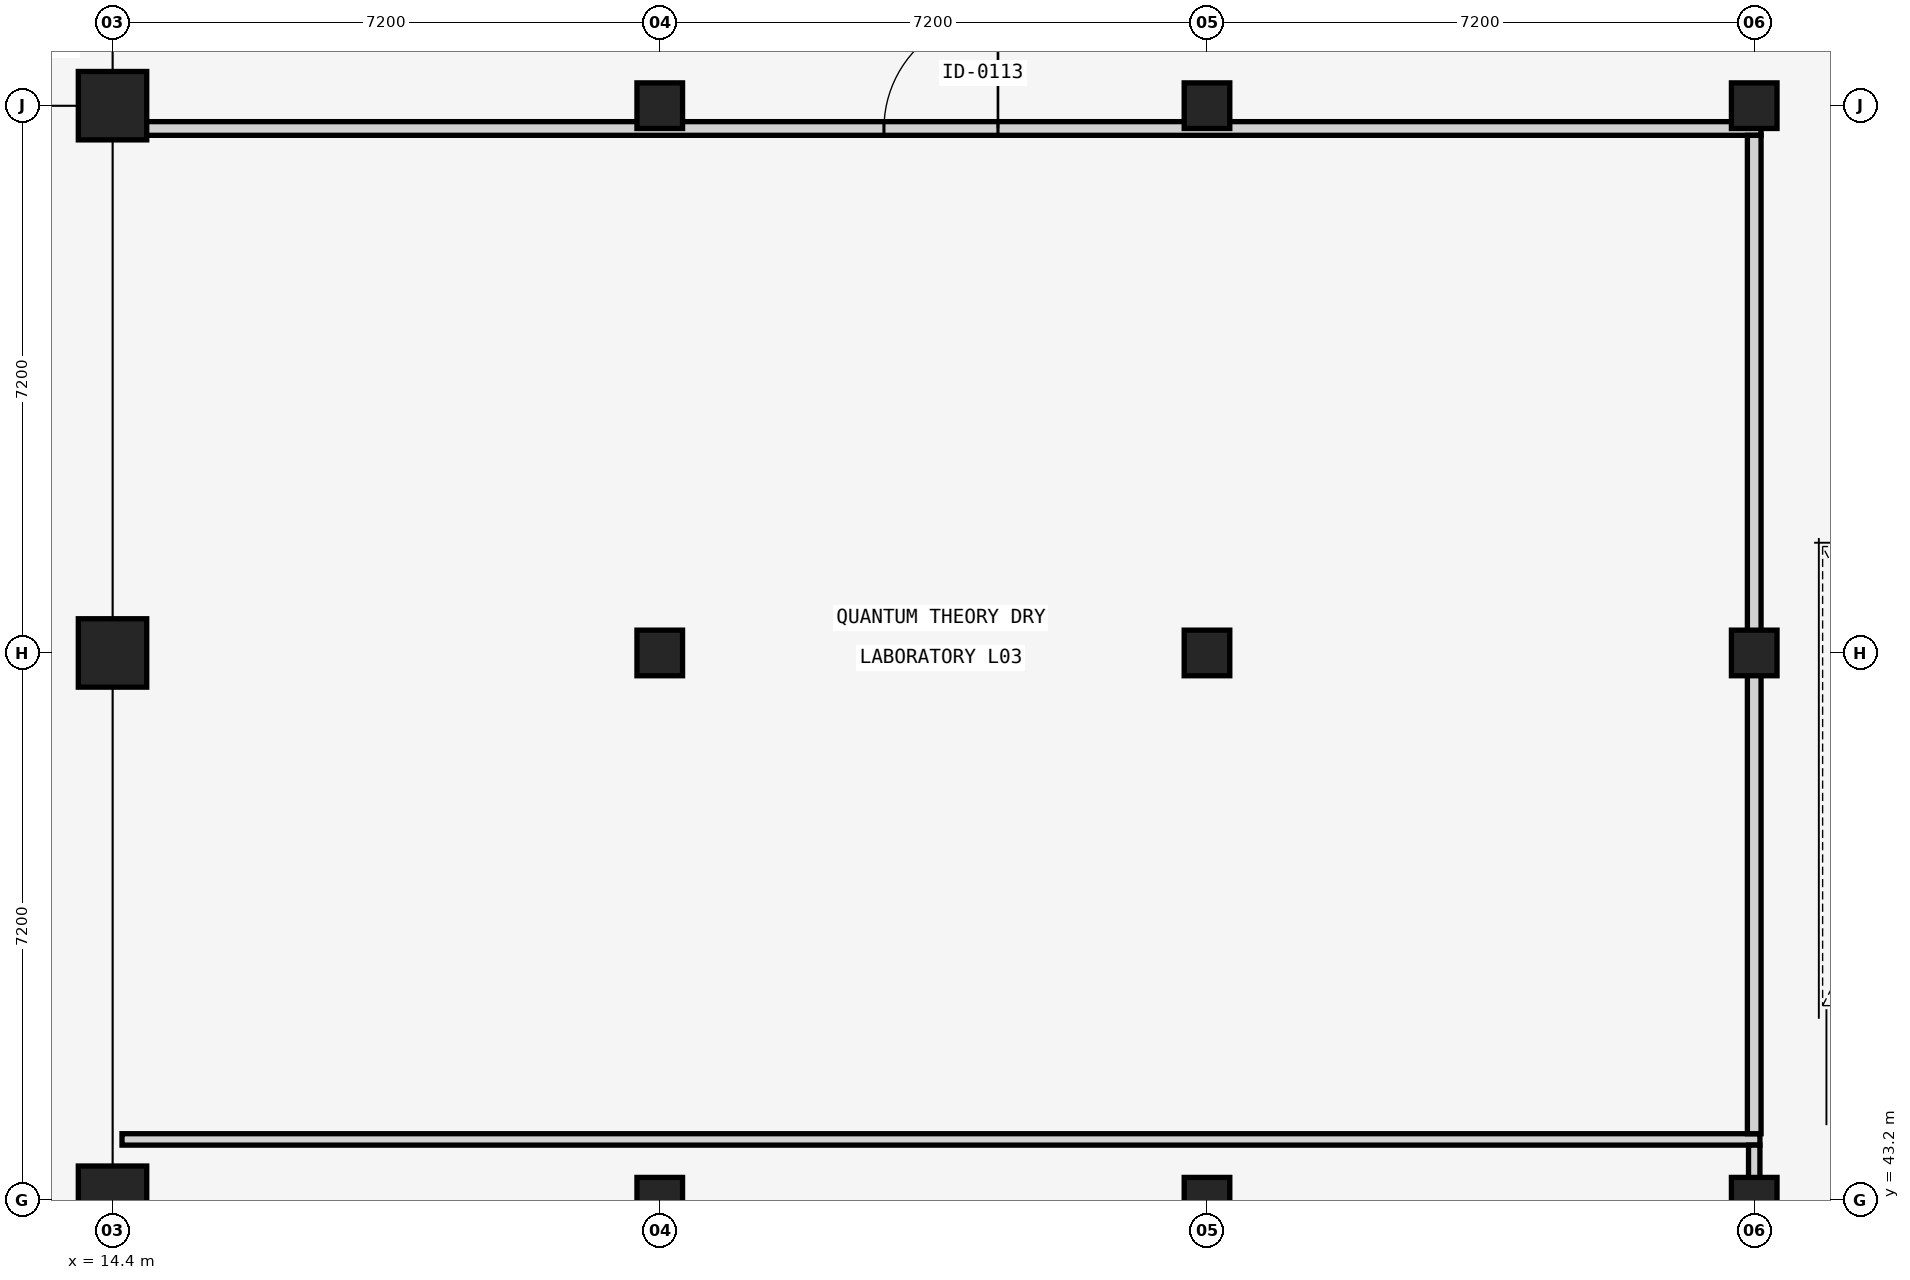
"""IFC4 building model, lengths in metres.
Left out: names, types, materials, properties, quantities, classifications, styles, units other than length and angle.
Written with IfcOpenShell. Run it as: python <this file> out.ifc"""

import sys

from ifc_helpers import new_model, si_unit, direction, frame, frame_2d, origin, origin_2d, place, context, subcontext, project, spatial, rectangle, extrude, element, fill, save


model = new_model("IFC4")
c1 = context("Model", 3, precision=1e-05, world=origin(), true_north=direction((0.0, 1.0)))
c2 = subcontext(c1, "Body", "Model", "MODEL_VIEW")
j1 = project(units=[si_unit("LENGTHUNIT", "METRE"), si_unit("PLANEANGLEUNIT", "RADIAN")], contexts=[c1])
p1 = place(None, origin())
s1 = spatial("IfcSite", under=j1, at=p1, CompositionType="ELEMENT")
p2 = place(p1, origin())
s2 = spatial("IfcBuilding", under=s1, at=p2, CompositionType="ELEMENT")
p3 = place(p2, frame((0.0, 0.0, 13.12)))
s3 = spatial("IfcBuildingStorey", under=s2, at=p3, CompositionType="ELEMENT", Elevation=13.12)
for number, where, z_axis, x_axis in (
    (1, (14.4, 43.2, 0.0), (0.0, 0.0, 1.0), (1.0, 0.0, 0.0)),
    (2, (14.4, 50.4, 0.0), (0.0, 0.0, 1.0), (1.0, 0.0, 0.0)),
    (3, (14.4, 57.6, 0.0), (0.0, 0.0, 1.0), (1.0, 0.0, 0.0)),
):
    element("IfcColumn", number, at=place(p3, frame(where, z_axis=z_axis, x_axis=x_axis)), inside=s3, PredefinedType="COLUMN", context=c2, shape_type="SweptSolid", body=[
        extrude(rectangle(XDim=0.9, YDim=0.9, at=origin_2d()), origin(), (0.0, 0.0, 1.0), 4.16),
    ])
for number, where, z_axis, x_axis in (
    (4, (21.6, 43.2, 0.0), (0.0, 0.0, 1.0), (1.0, 0.0, 0.0)),
    (5, (21.6, 50.4, 0.0), (0.0, 0.0, 1.0), (1.0, 0.0, 0.0)),
    (6, (21.6, 57.6, 0.0), (0.0, 0.0, 1.0), (1.0, 0.0, 0.0)),
    (7, (28.8, 43.2, 0.0), (0.0, 0.0, 1.0), (1.0, 0.0, 0.0)),
    (8, (28.8, 50.4, 0.0), (0.0, 0.0, 1.0), (1.0, 0.0, 0.0)),
    (9, (28.8, 57.6, 0.0), (0.0, 0.0, 1.0), (1.0, 0.0, 0.0)),
    (10, (36.0, 43.2, 0.0), (0.0, 0.0, 1.0), (1.0, 0.0, 0.0)),
    (11, (36.0, 50.4, 0.0), (0.0, 0.0, 1.0), (1.0, 0.0, 0.0)),
    (12, (36.0, 57.6, 0.0), (0.0, 0.0, 1.0), (1.0, 0.0, 0.0)),
):
    element("IfcColumn", number, at=place(p3, frame(where, z_axis=z_axis, x_axis=x_axis)), inside=s3, PredefinedType="COLUMN", context=c2, shape_type="SweptSolid", body=[
        extrude(rectangle(XDim=0.6, YDim=0.6, at=origin_2d()), origin(), (0.0, 0.0, 1.0), 4.16),
    ])
p4 = place(p3, frame((14.525, 44.0, 0.0), z_axis=(0.0, 0.0, 1.0), x_axis=(1.0, 0.0, 0.0)))
e13 = element("IfcWall", 13, at=p4, inside=s3, PredefinedType="PARTITIONING", context=c2, shape_type="SweptSolid", body=[
    extrude(rectangle(XDim=21.55, YDim=0.15, at=frame_2d((10.775, 0.0))), origin(), (0.0, 0.0, 1.0), 2.81),
])
p5 = place(p3, frame((36.0, 36.375, 0.0), z_axis=(0.0, 0.0, 1.0), x_axis=(0.0, 1.0, 0.0)))
e14 = element("IfcWall", 14, at=p5, inside=s3, PredefinedType="PARTITIONING", context=c2, shape_type="SweptSolid", body=[
    extrude(rectangle(XDim=7.55, YDim=0.15, at=frame_2d((3.775, 0.0))), origin(), (0.0, 0.0, 1.0), 3.81),
])
p6 = place(p5, frame((3.075, 0.0, 0.0)))
e15 = element("IfcOpeningElement", 15, at=p6, cuts=e14, PredefinedType="OPENING", context=c2, shape_type="SweptSolid", body=[
    extrude(rectangle(XDim=1.4, YDim=2.2, at=frame_2d((0.7, 1.1))), frame((0.0, 0.085, 0.0), z_axis=(0.0, -1.0, 0.0), x_axis=(1.0, 0.0, 0.0)), (0.0, 0.0, 1.0), 0.17),
])
p7 = place(p3, frame((14.51, 57.3, 0.0), z_axis=(0.0, 0.0, 1.0), x_axis=(1.0, 0.0, 0.0)))
e16 = element("IfcWall", 16, at=p7, inside=s3, PredefinedType="PARTITIONING", context=c2, shape_type="SweptSolid", body=[
    extrude(rectangle(XDim=21.58, YDim=0.18, at=frame_2d((10.79, 0.0))), origin(), (0.0, 0.0, 1.0), 2.81),
])
p8 = place(p7, frame((10.04, 0.0, 0.0)))
e17 = element("IfcOpeningElement", 17, at=p8, cuts=e16, PredefinedType="OPENING", context=c2, shape_type="SweptSolid", body=[
    extrude(rectangle(XDim=1.5, YDim=2.2, at=frame_2d((0.75, 1.1))), frame((0.0, 0.1, 0.0), z_axis=(0.0, -1.0, 0.0), x_axis=(1.0, 0.0, 0.0)), (0.0, 0.0, 1.0), 0.2),
])
p9 = place(p3, frame((36.0, 44.075, 0.0), z_axis=(0.0, 0.0, 1.0), x_axis=(0.0, 1.0, 0.0)))
e18 = element("IfcWall", 18, at=p9, inside=s3, PredefinedType="PARTITIONING", context=c2, shape_type="SweptSolid", body=[
    extrude(rectangle(XDim=13.135, YDim=0.18, at=frame_2d((6.567, 0.0))), origin(), (0.0, 0.0, 1.0), 3.81),
])
p10 = place(p8, origin())
e19 = element("IfcDoor", 19, at=p10, inside=s3, OperationType="SINGLE_SWING_RIGHT", PredefinedType="DOOR", context=c2, shape_type="SweptSolid", body=[
    extrude(rectangle(XDim=1.5, YDim=2.2, at=frame_2d((0.75, 1.1))), frame((0.0, 0.025, 0.0), z_axis=(0.0, -1.0, 0.0), x_axis=(1.0, 0.0, 0.0)), (0.0, 0.0, 1.0), 0.05),
])
fill(e17, e19)
save(model, sys.argv[1])
